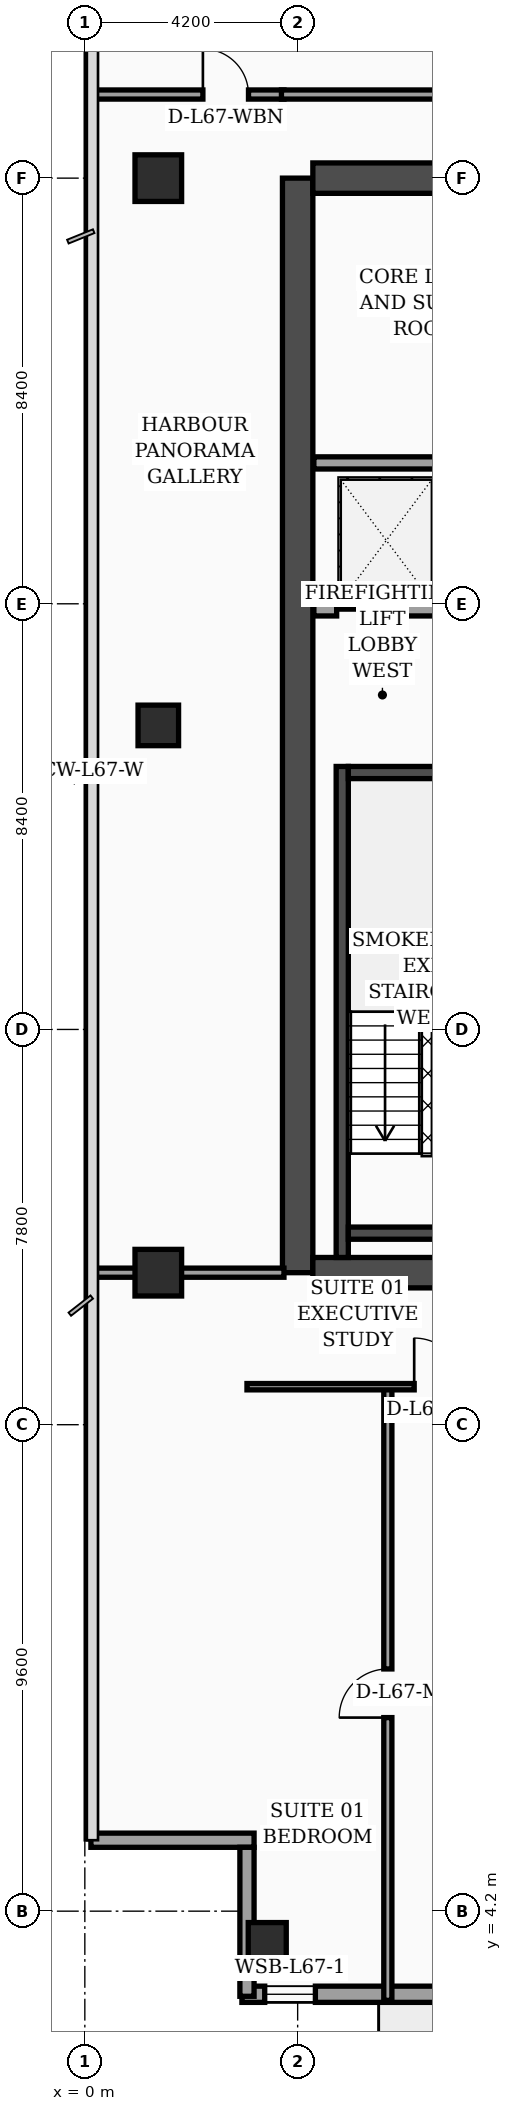
"""IFC4 building model, lengths in metres.
Left out: names, types, materials, properties, quantities, classifications, styles, units other than length and angle.
Written with IfcOpenShell. Run it as: python <this file> out.ifc"""

import sys

from ifc_helpers import new_model, si_unit, direction, frame, frame_2d, origin, origin_2d, place, context, subcontext, project, spatial, rectangle, hollow_rectangle, extrude, element, fill, save


model = new_model("IFC4")
c1 = context("Model", 3, precision=1e-05, world=origin(), true_north=direction((0.0, 1.0)))
c2 = subcontext(c1, "Body", "Model", "MODEL_VIEW")
j1 = project(units=[si_unit("LENGTHUNIT", "METRE"), si_unit("PLANEANGLEUNIT", "RADIAN")], contexts=[c1])
p1 = place(None, origin())
s1 = spatial("IfcSite", under=j1, at=p1, CompositionType="ELEMENT")
p2 = place(p1, origin())
s2 = spatial("IfcBuilding", under=s1, at=p2, CompositionType="ELEMENT")
p3 = place(p2, frame((0.0, 0.0, 271.1)))
s3 = spatial("IfcBuildingStorey", under=s2, at=p3, CompositionType="ELEMENT", Elevation=271.1)
p4 = place(p3, frame((4.2, 16.8, 0.0), z_axis=(0.0, 0.0, 1.0), x_axis=(0.0, 1.0, 0.0)))
e1 = element("IfcWall", 1, at=p4, inside=s3, PredefinedType="SHEAR", context=c2, shape_type="SweptSolid", body=[
    extrude(rectangle(XDim=21.6, YDim=0.6, at=frame_2d((10.8, 0.0))), origin(), (0.0, 0.0, 1.0), 3.56),
])
p5 = place(p3, frame((4.5, 38.4, 0.0), z_axis=(0.0, 0.0, 1.0), x_axis=(1.0, 0.0, 0.0)))
e2 = element("IfcWall", 2, at=p5, inside=s3, PredefinedType="SHEAR", context=c2, shape_type="SweptSolid", body=[
    extrude(rectangle(XDim=10.2, YDim=0.6, at=frame_2d((5.1, 0.0))), origin(), (0.0, 0.0, 1.0), 3.56),
])
p6 = place(p5, frame((5.8, 0.0, 0.0)))
e3 = element("IfcOpeningElement", 3, at=p6, cuts=e2, PredefinedType="OPENING", context=c2, shape_type="SweptSolid", body=[
    extrude(rectangle(XDim=1.1, YDim=2.2, at=frame_2d((0.55, 1.1))), frame((0.0, 0.31, 0.0), z_axis=(0.0, -1.0, 0.0), x_axis=(1.0, 0.0, 0.0)), (0.0, 0.0, 1.0), 0.62),
])
p7 = place(p3, frame((4.5, 16.8, 0.0), z_axis=(0.0, 0.0, 1.0), x_axis=(1.0, 0.0, 0.0)))
e4 = element("IfcWall", 4, at=p7, inside=s3, PredefinedType="SHEAR", context=c2, shape_type="SweptSolid", body=[
    extrude(rectangle(XDim=10.2, YDim=0.6, at=frame_2d((5.1, 0.0))), origin(), (0.0, 0.0, 1.0), 3.56),
])
p8 = place(p3, frame((5.08, 17.1, 0.0), z_axis=(0.0, 0.0, 1.0), x_axis=(0.0, 1.0, 0.0)))
e5 = element("IfcWall", 5, at=p8, inside=s3, PredefinedType="SOLIDWALL", context=c2, shape_type="SweptSolid", body=[
    extrude(rectangle(XDim=9.69, YDim=0.24, at=frame_2d((4.845, 0.0))), origin(), (0.0, 0.0, 1.0), 3.56),
])
for number, where, z_axis, x_axis in (
    (6, (5.2, 17.58, 0.0), (0.0, 0.0, 1.0), (1.0, 0.0, 0.0)),
    (7, (5.2, 26.67, 0.0), (0.0, 0.0, 1.0), (1.0, 0.0, 0.0)),
):
    element("IfcWall", number, at=place(p3, frame(where, z_axis=z_axis, x_axis=x_axis)), inside=s3, PredefinedType="SOLIDWALL", context=c2, shape_type="SweptSolid", body=[
        extrude(rectangle(XDim=3.1, YDim=0.24, at=frame_2d((1.55, 0.0))), origin(), (0.0, 0.0, 1.0), 3.56),
    ])
p9 = place(p3, frame((3.6, 3.6, 0.0), z_axis=(0.0, 0.0, 1.0), x_axis=(1.0, 0.0, 0.0)))
e8 = element("IfcColumn", 8, at=p9, inside=s3, PredefinedType="COLUMN", context=c2, shape_type="SweptSolid", body=[
    extrude(hollow_rectangle(XDim=0.75, YDim=0.75, WallThickness=0.032, at=origin_2d()), origin(), (0.0, 0.0, 1.0), 3.56),
])
p10 = place(p3, frame((1.45, 16.8, 0.0), z_axis=(0.0, 0.0, 1.0), x_axis=(1.0, 0.0, 0.0)))
e9 = element("IfcColumn", 9, at=p10, inside=s3, PredefinedType="COLUMN", context=c2, shape_type="SweptSolid", body=[
    extrude(rectangle(XDim=0.92, YDim=0.92, at=origin_2d()), origin(), (0.0, 0.0, 1.0), 3.56),
])
p11 = place(p3, frame((1.45, 27.6, 0.0), z_axis=(0.0, 0.0, 1.0), x_axis=(1.0, 0.0, 0.0)))
e10 = element("IfcColumn", 10, at=p11, inside=s3, PredefinedType="COLUMN", context=c2, shape_type="SweptSolid", body=[
    extrude(rectangle(XDim=0.8, YDim=0.8, at=origin_2d()), origin(), (0.0, 0.0, 1.0), 3.56),
])
p12 = place(p3, frame((1.45, 38.4, 0.0), z_axis=(0.0, 0.0, 1.0), x_axis=(1.0, 0.0, 0.0)))
e11 = element("IfcColumn", 11, at=p12, inside=s3, PredefinedType="COLUMN", context=c2, shape_type="SweptSolid", body=[
    extrude(rectangle(XDim=0.92, YDim=0.92, at=origin_2d()), origin(), (0.0, 0.0, 1.0), 3.56),
])
p13 = place(p3, frame((3.1, 2.56, 0.0), z_axis=(0.0, 0.0, 1.0), x_axis=(1.0, 0.0, 0.0)))
e12 = element("IfcWall", 12, at=p13, inside=s3, PredefinedType="SOLIDWALL", context=c2, shape_type="SweptSolid", body=[
    extrude(rectangle(XDim=8.0, YDim=0.32, at=frame_2d((4.0, 0.0))), origin(), (0.0, 0.0, 1.0), 3.56),
])
p14 = place(p13, frame((0.45, 0.0, 0.75)))
e13 = element("IfcOpeningElement", 13, at=p14, cuts=e12, PredefinedType="OPENING", context=c2, shape_type="SweptSolid", body=[
    extrude(rectangle(XDim=1.0, YDim=1.6, at=frame_2d((0.5, 0.8))), frame((0.0, 0.17, 0.0), z_axis=(0.0, -1.0, 0.0), x_axis=(1.0, 0.0, 0.0)), (0.0, 0.0, 1.0), 0.34),
])
p15 = place(p13, frame((4.2, 0.0, 0.0)))
e14 = element("IfcOpeningElement", 14, at=p15, cuts=e12, PredefinedType="OPENING", context=c2, shape_type="SweptSolid", body=[
    extrude(rectangle(XDim=1.4, YDim=2.25, at=frame_2d((0.7, 1.125))), frame((0.0, 0.17, 0.0), z_axis=(0.0, -1.0, 0.0), x_axis=(1.0, 0.0, 0.0)), (0.0, 0.0, 1.0), 0.34),
])
p16 = place(p3, frame((0.12, 5.6, 0.0), z_axis=(0.0, 0.0, 1.0), x_axis=(1.0, 0.0, 0.0)))
e15 = element("IfcWall", 15, at=p16, inside=s3, PredefinedType="SOLIDWALL", context=c2, shape_type="SweptSolid", body=[
    extrude(rectangle(XDim=3.22, YDim=0.28, at=frame_2d((1.61, 0.0))), origin(), (0.0, 0.0, 1.0), 2.99),
])
p17 = place(p3, frame((3.2, 5.46, 0.0), z_axis=(0.0, 0.0, 1.0), x_axis=(0.0, -1.0, 0.0)))
e16 = element("IfcWall", 16, at=p17, inside=s3, PredefinedType="SOLIDWALL", context=c2, shape_type="SweptSolid", body=[
    extrude(rectangle(XDim=2.94, YDim=0.28, at=frame_2d((1.47, 0.0))), origin(), (0.0, 0.0, 1.0), 2.99),
])
p18 = place(p3, frame((4.52, 29.88, 0.0), z_axis=(0.0, 0.0, 1.0), x_axis=(1.0, 0.0, 0.0)))
e17 = element("IfcWall", 17, at=p18, inside=s3, PredefinedType="SOLIDWALL", context=c2, shape_type="SweptSolid", body=[
    extrude(rectangle(XDim=4.9, YDim=0.24, at=frame_2d((2.45, 0.0))), origin(), (0.0, 0.0, 1.0), 3.56),
])
p19 = place(p18, frame((0.45, 0.0, 0.0)))
e18 = element("IfcOpeningElement", 18, at=p19, cuts=e17, PredefinedType="OPENING", context=c2, shape_type="SweptSolid", body=[
    extrude(rectangle(XDim=1.3, YDim=2.35, at=frame_2d((0.65, 1.175))), frame((0.0, 0.13, 0.0), z_axis=(0.0, -1.0, 0.0), x_axis=(1.0, 0.0, 0.0)), (0.0, 0.0, 1.0), 0.26),
])
p20 = place(p3, frame((4.52, 32.78, 0.0), z_axis=(0.0, 0.0, 1.0), x_axis=(1.0, 0.0, 0.0)))
e19 = element("IfcWall", 19, at=p20, inside=s3, PredefinedType="SOLIDWALL", context=c2, shape_type="SweptSolid", body=[
    extrude(rectangle(XDim=4.9, YDim=0.24, at=frame_2d((2.45, 0.0))), origin(), (0.0, 0.0, 1.0), 3.19),
])
p21 = place(p3, frame((0.08, 16.8, 0.0), z_axis=(0.0, 0.0, 1.0), x_axis=(1.0, 0.0, 0.0)))
e20 = element("IfcWall", 20, at=p21, inside=s3, PredefinedType="PARTITIONING", context=c2, shape_type="SweptSolid", body=[
    extrude(rectangle(XDim=3.85, YDim=0.18, at=frame_2d((1.925, 0.0))), origin(), (0.0, 0.0, 1.0), 2.99),
])
p22 = place(p3, frame((0.08, 40.05, 0.0), z_axis=(0.0, 0.0, 1.0), x_axis=(1.0, 0.0, 0.0)))
e21 = element("IfcWall", 21, at=p22, inside=s3, PredefinedType="PARTITIONING", context=c2, shape_type="SweptSolid", body=[
    extrude(rectangle(XDim=3.85, YDim=0.18, at=frame_2d((1.925, 0.0))), origin(), (0.0, 0.0, 1.0), 2.99),
])
p23 = place(p22, frame((2.25, 0.0, 0.0)))
e22 = element("IfcOpeningElement", 22, at=p23, cuts=e21, PredefinedType="OPENING", context=c2, shape_type="SweptSolid", body=[
    extrude(rectangle(XDim=0.9, YDim=2.15, at=frame_2d((0.45, 1.075))), frame((0.0, 0.1, 0.0), z_axis=(0.0, -1.0, 0.0), x_axis=(1.0, 0.0, 0.0)), (0.0, 0.0, 1.0), 0.2),
])
p24 = place(p3, frame((5.98, 2.44, 0.0), z_axis=(0.0, 0.0, 1.0), x_axis=(0.0, 1.0, 0.0)))
e23 = element("IfcWall", 23, at=p24, inside=s3, PredefinedType="PARTITIONING", context=c2, shape_type="SweptSolid", body=[
    extrude(rectangle(XDim=12.11, YDim=0.16, at=frame_2d((6.055, 0.0))), origin(), (0.0, 0.0, 1.0), 3.09),
])
p25 = place(p24, frame((5.58, 0.0, 0.0)))
e24 = element("IfcOpeningElement", 24, at=p25, cuts=e23, PredefinedType="OPENING", context=c2, shape_type="SweptSolid", body=[
    extrude(rectangle(XDim=0.96, YDim=2.2, at=frame_2d((0.48, 1.1))), frame((0.0, 0.09, 0.0), z_axis=(0.0, -1.0, 0.0), x_axis=(1.0, 0.0, 0.0)), (0.0, 0.0, 1.0), 0.18),
])
p26 = place(p3, frame((3.2, 14.55, 0.0), z_axis=(0.0, 0.0, 1.0), x_axis=(1.0, 0.0, 0.0)))
e25 = element("IfcWall", 25, at=p26, inside=s3, PredefinedType="PARTITIONING", context=c2, shape_type="SweptSolid", body=[
    extrude(rectangle(XDim=9.4, YDim=0.125, at=frame_2d((4.7, 0.0))), origin(), (0.0, 0.0, 1.0), 2.99),
])
p27 = place(p26, frame((3.3, 0.0, 0.0)))
e26 = element("IfcOpeningElement", 26, at=p27, cuts=e25, PredefinedType="OPENING", context=c2, shape_type="SweptSolid", body=[
    extrude(rectangle(XDim=0.96, YDim=2.2, at=frame_2d((0.48, 1.1))), frame((0.0, 0.073, 0.0), z_axis=(0.0, -1.0, 0.0), x_axis=(1.0, 0.0, 0.0)), (0.0, 0.0, 1.0), 0.145),
])
p28 = place(p26, frame((7.49, 0.0, 0.0)))
e27 = element("IfcOpeningElement", 27, at=p28, cuts=e25, PredefinedType="OPENING", context=c2, shape_type="SweptSolid", body=[
    extrude(rectangle(XDim=0.9, YDim=2.15, at=frame_2d((0.45, 1.075))), frame((0.0, 0.073, 0.0), z_axis=(0.0, -1.0, 0.0), x_axis=(1.0, 0.0, 0.0)), (0.0, 0.0, 1.0), 0.145),
])
p29 = place(p3, frame((3.88, 40.05, 0.0), z_axis=(0.0, 0.0, 1.0), x_axis=(1.0, 0.0, 0.0)))
e28 = element("IfcWall", 28, at=p29, inside=s3, PredefinedType="PARTITIONING", context=c2, shape_type="SweptSolid", body=[
    extrude(rectangle(XDim=11.27, YDim=0.18, at=frame_2d((5.635, 0.0))), origin(), (0.0, 0.0, 1.0), 2.99),
])
p30 = place(p14, origin())
e29 = element("IfcWindow", 29, at=p30, inside=s3, PartitioningType="SINGLE_PANEL", PredefinedType="WINDOW", context=c2, shape_type="SweptSolid", body=[
    extrude(rectangle(XDim=1.0, YDim=1.6, at=frame_2d((0.5, 0.8))), frame((0.0, 0.03, 0.0), z_axis=(0.0, -1.0, 0.0), x_axis=(1.0, 0.0, 0.0)), (0.0, 0.0, 1.0), 0.06),
])
fill(e13, e29)
p31 = place(p19, origin())
e30 = element("IfcDoor", 30, at=p31, inside=s3, OperationType="DOUBLE_DOOR_SLIDING", PredefinedType="DOOR", context=c2, shape_type="SweptSolid", body=[
    extrude(rectangle(XDim=1.3, YDim=2.35, at=frame_2d((0.65, 1.175))), frame((0.0, 0.025, 0.0), z_axis=(0.0, -1.0, 0.0), x_axis=(1.0, 0.0, 0.0)), (0.0, 0.0, 1.0), 0.05),
])
fill(e18, e30)
p32 = place(p23, origin())
e31 = element("IfcDoor", 31, at=p32, inside=s3, OperationType="SINGLE_SWING_LEFT", PredefinedType="DOOR", context=c2, shape_type="SweptSolid", body=[
    extrude(rectangle(XDim=0.9, YDim=2.15, at=frame_2d((0.45, 1.075))), frame((0.0, 0.025, 0.0), z_axis=(0.0, -1.0, 0.0), x_axis=(1.0, 0.0, 0.0)), (0.0, 0.0, 1.0), 0.05),
])
fill(e22, e31)
p33 = place(p25, origin())
e32 = element("IfcDoor", 32, at=p33, inside=s3, OperationType="SINGLE_SWING_LEFT", PredefinedType="DOOR", context=c2, shape_type="SweptSolid", body=[
    extrude(rectangle(XDim=0.96, YDim=2.2, at=frame_2d((0.48, 1.1))), frame((0.0, 0.025, 0.0), z_axis=(0.0, -1.0, 0.0), x_axis=(1.0, 0.0, 0.0)), (0.0, 0.0, 1.0), 0.05),
])
fill(e24, e32)
p34 = place(p27, origin())
e33 = element("IfcDoor", 33, at=p34, inside=s3, OperationType="SINGLE_SWING_LEFT", PredefinedType="DOOR", context=c2, shape_type="SweptSolid", body=[
    extrude(rectangle(XDim=0.96, YDim=2.2, at=frame_2d((0.48, 1.1))), frame((0.0, 0.025, 0.0), z_axis=(0.0, -1.0, 0.0), x_axis=(1.0, 0.0, 0.0)), (0.0, 0.0, 1.0), 0.05),
])
fill(e26, e33)
save(model, sys.argv[1])
